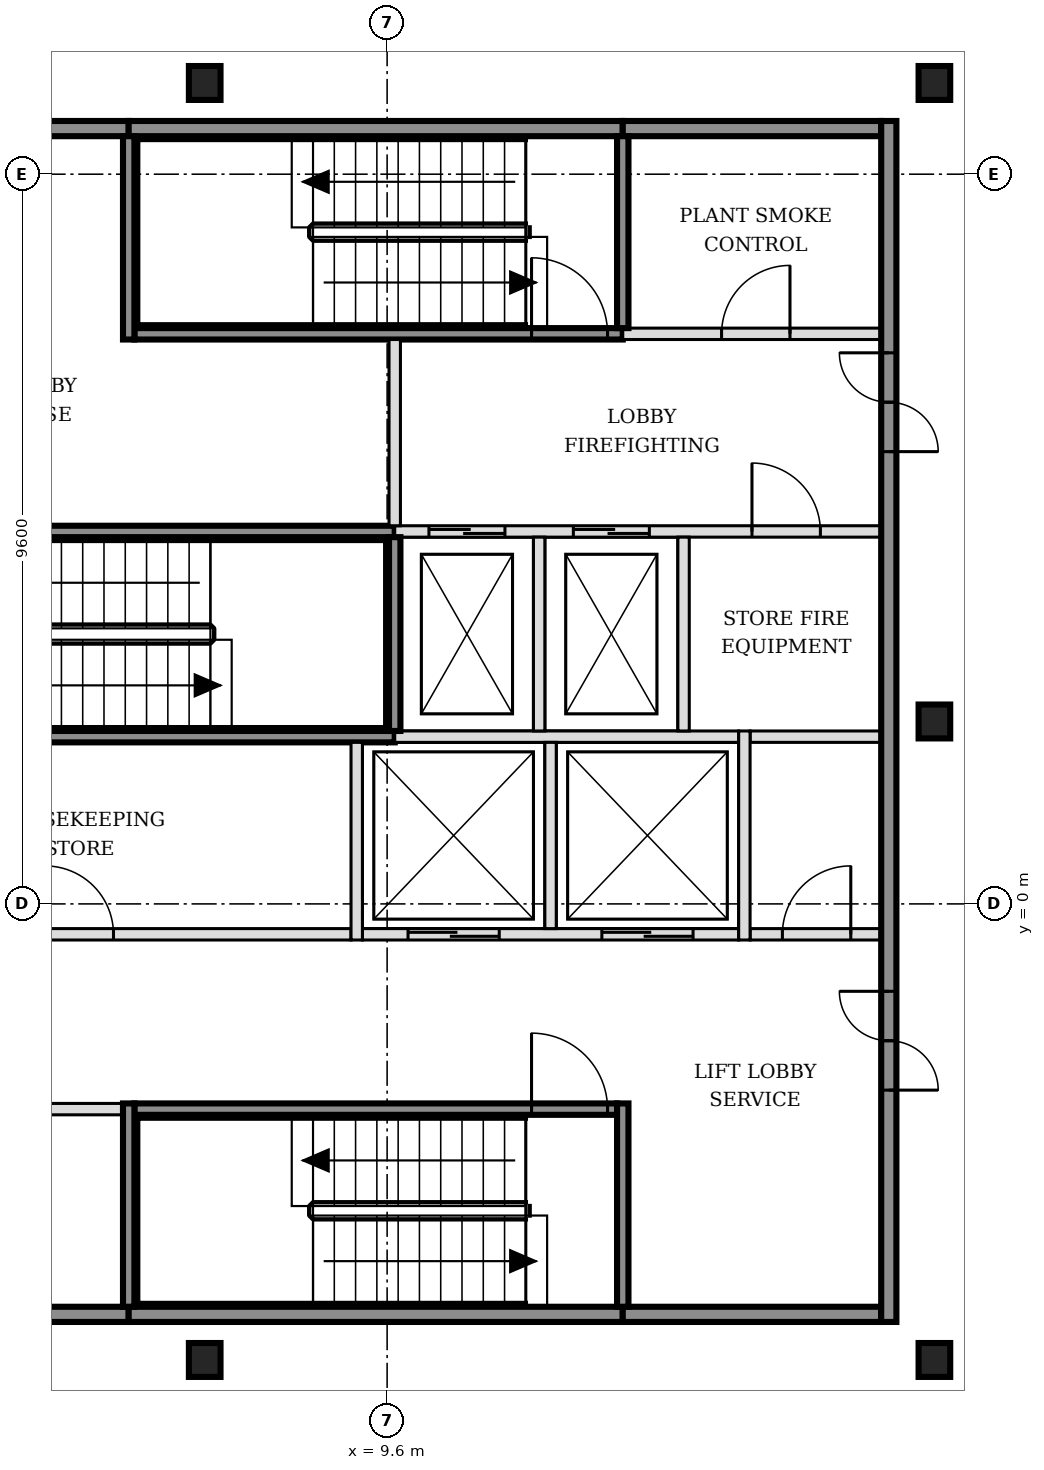
"""IFC4 building model, lengths in metres.
Left out: names, types, materials, properties, quantities, classifications, styles, units other than length and angle.
Written with IfcOpenShell. Run it as: python <this file> out.ifc"""

import sys

from ifc_helpers import new_model, si_unit, direction, frame, frame_2d, origin, origin_2d, place, context, subcontext, project, spatial, rectangle, i_section, extrude, element, fill, save


model = new_model("IFC4")
c1 = context("Model", 3, precision=1e-05, world=origin(), true_north=direction((0.0, 1.0)))
c2 = subcontext(c1, "Body", "Model", "MODEL_VIEW")
j1 = project(units=[si_unit("LENGTHUNIT", "METRE"), si_unit("PLANEANGLEUNIT", "RADIAN")], contexts=[c1])
p1 = place(None, origin())
s1 = spatial("IfcSite", under=j1, at=p1, CompositionType="ELEMENT")
p2 = place(p1, origin())
s2 = spatial("IfcBuilding", under=s1, at=p2, CompositionType="ELEMENT")
p3 = place(p2, frame((0.0, 0.0, 183.0)))
s3 = spatial("IfcBuildingStorey", under=s2, at=p3, CompositionType="ELEMENT", Elevation=183.0)
for number, where, z_axis, x_axis in (
    (1, (7.2, -6.0, -0.15), (0.0, 0.0, 1.0), (1.0, 0.0, 0.0)),
    (2, (16.8, -6.0, -0.15), (0.0, 0.0, 1.0), (1.0, 0.0, 0.0)),
    (3, (16.8, 2.4, -0.15), (0.0, 0.0, 1.0), (1.0, 0.0, 0.0)),
    (4, (7.2, 10.8, -0.15), (0.0, 0.0, 1.0), (1.0, 0.0, 0.0)),
    (5, (16.8, 10.8, -0.15), (0.0, 0.0, 1.0), (1.0, 0.0, 0.0)),
):
    element("IfcColumn", number, at=place(p3, frame(where, z_axis=z_axis, x_axis=x_axis)), inside=s3, PredefinedType="COLUMN", context=c2, shape_type="SweptSolid", body=[
        extrude(i_section(OverallWidth=0.416, OverallDepth=0.446, WebThickness=0.039, FlangeThickness=0.063, FilletRadius=0.015, at=origin_2d()), origin(), (0.0, 0.0, 1.0), 3.6),
    ])
p4 = place(p3, frame((-1.7, -5.4, 0.0), z_axis=(0.0, 0.0, 1.0), x_axis=(1.0, 0.0, 0.0)))
e6 = element("IfcWall", 6, at=p4, inside=s3, PredefinedType="SOLIDWALL", context=c2, shape_type="SweptSolid", body=[
    extrude(rectangle(XDim=7.9, YDim=0.2, at=frame_2d((3.95, 0.0))), origin(), (0.0, 0.0, 1.0), 3.45),
])
p5 = place(p3, frame((6.2, -5.4, 0.0), z_axis=(0.0, 0.0, 1.0), x_axis=(1.0, 0.0, 0.0)))
e7 = element("IfcWall", 7, at=p5, inside=s3, PredefinedType="SOLIDWALL", context=c2, shape_type="SweptSolid", body=[
    extrude(rectangle(XDim=6.5, YDim=0.2, at=frame_2d((3.25, 0.0))), origin(), (0.0, 0.0, 1.0), 3.45),
])
p6 = place(p3, frame((12.7, -5.4, 0.0), z_axis=(0.0, 0.0, 1.0), x_axis=(1.0, 0.0, 0.0)))
e8 = element("IfcWall", 8, at=p6, inside=s3, PredefinedType="SOLIDWALL", context=c2, shape_type="SweptSolid", body=[
    extrude(rectangle(XDim=3.4, YDim=0.2, at=frame_2d((1.7, 0.0))), origin(), (0.0, 0.0, 1.0), 3.45),
])
p7 = place(p3, frame((-1.7, -2.7, 0.0), z_axis=(0.0, 0.0, 1.0), x_axis=(1.0, 0.0, 0.0)))
e9 = element("IfcWall", 9, at=p7, inside=s3, PredefinedType="PARTITIONING", context=c2, shape_type="SweptSolid", body=[
    extrude(rectangle(XDim=7.825, YDim=0.15, at=frame_2d((3.913, 0.0))), origin(), (0.0, 0.0, 1.0), 3.45),
])
p8 = place(p7, frame((3.45, 0.0, 0.0)))
e10 = element("IfcOpeningElement", 10, at=p8, cuts=e9, PredefinedType="OPENING", context=c2, shape_type="SweptSolid", body=[
    extrude(rectangle(XDim=0.9, YDim=2.1, at=frame_2d((0.45, 1.05))), frame((0.0, 0.085, 0.0), z_axis=(0.0, -1.0, 0.0), x_axis=(1.0, 0.0, 0.0)), (0.0, 0.0, 1.0), 0.17),
])
p9 = place(p3, frame((6.275, -2.7, 0.0), z_axis=(0.0, 0.0, 1.0), x_axis=(1.0, 0.0, 0.0)))
e11 = element("IfcWall", 11, at=p9, inside=s3, PredefinedType="SOLIDWALL", context=c2, shape_type="SweptSolid", body=[
    extrude(rectangle(XDim=6.35, YDim=0.15, at=frame_2d((3.175, 0.0))), origin(), (0.0, 0.0, 1.0), 3.45),
])
p10 = place(p9, frame((5.225, 0.0, 0.0)))
e12 = element("IfcOpeningElement", 12, at=p10, cuts=e11, PredefinedType="OPENING", context=c2, shape_type="SweptSolid", body=[
    extrude(rectangle(XDim=1.0, YDim=2.1, at=frame_2d((0.5, 1.05))), frame((0.0, 0.085, 0.0), z_axis=(0.0, -1.0, 0.0), x_axis=(1.0, 0.0, 0.0)), (0.0, 0.0, 1.0), 0.17),
])
p11 = place(p3, frame((-1.7, -0.4, 0.0), z_axis=(0.0, 0.0, 1.0), x_axis=(1.0, 0.0, 0.0)))
e13 = element("IfcWall", 13, at=p11, inside=s3, PredefinedType="PARTITIONING", context=c2, shape_type="SweptSolid", body=[
    extrude(rectangle(XDim=10.825, YDim=0.15, at=frame_2d((5.413, 0.0))), origin(), (0.0, 0.0, 1.0), 3.45),
])
p12 = place(p11, frame((1.3, 0.0, 0.0)))
e14 = element("IfcOpeningElement", 14, at=p12, cuts=e13, PredefinedType="OPENING", context=c2, shape_type="SweptSolid", body=[
    extrude(rectangle(XDim=0.9, YDim=2.1, at=frame_2d((0.45, 1.05))), frame((0.0, 0.085, 0.0), z_axis=(0.0, -1.0, 0.0), x_axis=(1.0, 0.0, 0.0)), (0.0, 0.0, 1.0), 0.17),
])
p13 = place(p11, frame((6.8, 0.0, 0.0)))
e15 = element("IfcOpeningElement", 15, at=p13, cuts=e13, PredefinedType="OPENING", context=c2, shape_type="SweptSolid", body=[
    extrude(rectangle(XDim=0.9, YDim=2.1, at=frame_2d((0.45, 1.05))), frame((0.0, 0.085, 0.0), z_axis=(0.0, -1.0, 0.0), x_axis=(1.0, 0.0, 0.0)), (0.0, 0.0, 1.0), 0.17),
])
p14 = place(p3, frame((9.275, -0.4, 0.0), z_axis=(0.0, 0.0, 1.0), x_axis=(1.0, 0.0, 0.0)))
e16 = element("IfcWall", 16, at=p14, inside=s3, PredefinedType="SOLIDWALL", context=c2, shape_type="SweptSolid", body=[
    extrude(rectangle(XDim=4.95, YDim=0.15, at=frame_2d((2.475, 0.0))), origin(), (0.0, 0.0, 1.0), 3.45),
])
p15 = place(p14, frame((0.6, 0.0, 0.0)))
e17 = element("IfcOpeningElement", 17, at=p15, cuts=e16, PredefinedType="OPENING", context=c2, shape_type="SweptSolid", body=[
    extrude(rectangle(XDim=1.2, YDim=2.1, at=frame_2d((0.6, 1.05))), frame((0.0, 0.085, 0.0), z_axis=(0.0, -1.0, 0.0), x_axis=(1.0, 0.0, 0.0)), (0.0, 0.0, 1.0), 0.17),
])
p16 = place(p14, frame((3.15, 0.0, 0.0)))
e18 = element("IfcOpeningElement", 18, at=p16, cuts=e16, PredefinedType="OPENING", context=c2, shape_type="SweptSolid", body=[
    extrude(rectangle(XDim=1.2, YDim=2.1, at=frame_2d((0.6, 1.05))), frame((0.0, 0.085, 0.0), z_axis=(0.0, -1.0, 0.0), x_axis=(1.0, 0.0, 0.0)), (0.0, 0.0, 1.0), 0.17),
])
p17 = place(p3, frame((14.375, -0.4, 0.0), z_axis=(0.0, 0.0, 1.0), x_axis=(1.0, 0.0, 0.0)))
e19 = element("IfcWall", 19, at=p17, inside=s3, PredefinedType="PARTITIONING", context=c2, shape_type="SweptSolid", body=[
    extrude(rectangle(XDim=1.725, YDim=0.15, at=frame_2d((0.863, 0.0))), origin(), (0.0, 0.0, 1.0), 3.45),
])
p18 = place(p17, frame((0.425, 0.0, 0.0)))
e20 = element("IfcOpeningElement", 20, at=p18, cuts=e19, PredefinedType="OPENING", context=c2, shape_type="SweptSolid", body=[
    extrude(rectangle(XDim=0.9, YDim=2.1, at=frame_2d((0.45, 1.05))), frame((0.0, 0.085, 0.0), z_axis=(0.0, -1.0, 0.0), x_axis=(1.0, 0.0, 0.0)), (0.0, 0.0, 1.0), 0.17),
])
p19 = place(p3, frame((3.2, 2.2, 0.0), z_axis=(0.0, 0.0, 1.0), x_axis=(1.0, 0.0, 0.0)))
e21 = element("IfcWall", 21, at=p19, inside=s3, PredefinedType="SOLIDWALL", context=c2, shape_type="SweptSolid", body=[
    extrude(rectangle(XDim=6.5, YDim=0.15, at=frame_2d((3.25, 0.0))), origin(), (0.0, 0.0, 1.0), 3.45),
])
p20 = place(p3, frame((9.7, 2.2, 0.0), z_axis=(0.0, 0.0, 1.0), x_axis=(1.0, 0.0, 0.0)))
e22 = element("IfcWall", 22, at=p20, inside=s3, PredefinedType="SOLIDWALL", context=c2, shape_type="SweptSolid", body=[
    extrude(rectangle(XDim=4.525, YDim=0.15, at=frame_2d((2.263, 0.0))), origin(), (0.0, 0.0, 1.0), 3.45),
])
p21 = place(p3, frame((14.375, 2.2, 0.0), z_axis=(0.0, 0.0, 1.0), x_axis=(1.0, 0.0, 0.0)))
e23 = element("IfcWall", 23, at=p21, inside=s3, PredefinedType="PARTITIONING", context=c2, shape_type="SweptSolid", body=[
    extrude(rectangle(XDim=1.725, YDim=0.15, at=frame_2d((0.863, 0.0))), origin(), (0.0, 0.0, 1.0), 3.45),
])
p22 = place(p3, frame((3.2, 4.9, 0.0), z_axis=(0.0, 0.0, 1.0), x_axis=(1.0, 0.0, 0.0)))
e24 = element("IfcWall", 24, at=p22, inside=s3, PredefinedType="SOLIDWALL", context=c2, shape_type="SweptSolid", body=[
    extrude(rectangle(XDim=6.5, YDim=0.15, at=frame_2d((3.25, 0.0))), origin(), (0.0, 0.0, 1.0), 3.45),
])
p23 = place(p22, frame((0.175, 0.0, 0.0)))
e25 = element("IfcOpeningElement", 25, at=p23, cuts=e24, PredefinedType="OPENING", context=c2, shape_type="SweptSolid", body=[
    extrude(rectangle(XDim=1.0, YDim=2.1, at=frame_2d((0.5, 1.05))), frame((0.0, 0.085, 0.0), z_axis=(0.0, -1.0, 0.0), x_axis=(1.0, 0.0, 0.0)), (0.0, 0.0, 1.0), 0.17),
])
p24 = place(p3, frame((9.7, 4.9, 0.0), z_axis=(0.0, 0.0, 1.0), x_axis=(1.0, 0.0, 0.0)))
e26 = element("IfcWall", 26, at=p24, inside=s3, PredefinedType="SOLIDWALL", context=c2, shape_type="SweptSolid", body=[
    extrude(rectangle(XDim=6.4, YDim=0.15, at=frame_2d((3.2, 0.0))), origin(), (0.0, 0.0, 1.0), 3.45),
])
p25 = place(p24, frame((0.45, 0.0, 0.0)))
e27 = element("IfcOpeningElement", 27, at=p25, cuts=e26, PredefinedType="OPENING", context=c2, shape_type="SweptSolid", body=[
    extrude(rectangle(XDim=1.0, YDim=2.1, at=frame_2d((0.5, 1.05))), frame((0.0, 0.085, 0.0), z_axis=(0.0, -1.0, 0.0), x_axis=(1.0, 0.0, 0.0)), (0.0, 0.0, 1.0), 0.17),
])
p26 = place(p24, frame((2.35, 0.0, 0.0)))
e28 = element("IfcOpeningElement", 28, at=p26, cuts=e26, PredefinedType="OPENING", context=c2, shape_type="SweptSolid", body=[
    extrude(rectangle(XDim=1.0, YDim=2.1, at=frame_2d((0.5, 1.05))), frame((0.0, 0.085, 0.0), z_axis=(0.0, -1.0, 0.0), x_axis=(1.0, 0.0, 0.0)), (0.0, 0.0, 1.0), 0.17),
])
p27 = place(p24, frame((4.7, 0.0, 0.0)))
e29 = element("IfcOpeningElement", 29, at=p27, cuts=e26, PredefinedType="OPENING", context=c2, shape_type="SweptSolid", body=[
    extrude(rectangle(XDim=0.9, YDim=2.1, at=frame_2d((0.45, 1.05))), frame((0.0, 0.085, 0.0), z_axis=(0.0, -1.0, 0.0), x_axis=(1.0, 0.0, 0.0)), (0.0, 0.0, 1.0), 0.17),
])
p28 = place(p3, frame((6.275, 7.5, 0.0), z_axis=(0.0, 0.0, 1.0), x_axis=(1.0, 0.0, 0.0)))
e30 = element("IfcWall", 30, at=p28, inside=s3, PredefinedType="SOLIDWALL", context=c2, shape_type="SweptSolid", body=[
    extrude(rectangle(XDim=6.425, YDim=0.15, at=frame_2d((3.212, 0.0))), origin(), (0.0, 0.0, 1.0), 3.45),
])
p29 = place(p28, frame((5.225, 0.0, 0.0)))
e31 = element("IfcOpeningElement", 31, at=p29, cuts=e30, PredefinedType="OPENING", context=c2, shape_type="SweptSolid", body=[
    extrude(rectangle(XDim=1.0, YDim=2.1, at=frame_2d((0.5, 1.05))), frame((0.0, 0.085, 0.0), z_axis=(0.0, -1.0, 0.0), x_axis=(1.0, 0.0, 0.0)), (0.0, 0.0, 1.0), 0.17),
])
p30 = place(p3, frame((12.7, 7.5, 0.0), z_axis=(0.0, 0.0, 1.0), x_axis=(1.0, 0.0, 0.0)))
e32 = element("IfcWall", 32, at=p30, inside=s3, PredefinedType="SOLIDWALL", context=c2, shape_type="SweptSolid", body=[
    extrude(rectangle(XDim=3.4, YDim=0.15, at=frame_2d((1.7, 0.0))), origin(), (0.0, 0.0, 1.0), 3.45),
])
p31 = place(p30, frame((1.3, 0.0, 0.0)))
e33 = element("IfcOpeningElement", 33, at=p31, cuts=e32, PredefinedType="OPENING", context=c2, shape_type="SweptSolid", body=[
    extrude(rectangle(XDim=0.9, YDim=2.1, at=frame_2d((0.45, 1.05))), frame((0.0, 0.085, 0.0), z_axis=(0.0, -1.0, 0.0), x_axis=(1.0, 0.0, 0.0)), (0.0, 0.0, 1.0), 0.17),
])
p32 = place(p3, frame((-1.7, 10.2, 0.0), z_axis=(0.0, 0.0, 1.0), x_axis=(1.0, 0.0, 0.0)))
e34 = element("IfcWall", 34, at=p32, inside=s3, PredefinedType="SOLIDWALL", context=c2, shape_type="SweptSolid", body=[
    extrude(rectangle(XDim=7.9, YDim=0.2, at=frame_2d((3.95, 0.0))), origin(), (0.0, 0.0, 1.0), 3.45),
])
p33 = place(p3, frame((6.2, 10.2, 0.0), z_axis=(0.0, 0.0, 1.0), x_axis=(1.0, 0.0, 0.0)))
e35 = element("IfcWall", 35, at=p33, inside=s3, PredefinedType="SOLIDWALL", context=c2, shape_type="SweptSolid", body=[
    extrude(rectangle(XDim=6.5, YDim=0.2, at=frame_2d((3.25, 0.0))), origin(), (0.0, 0.0, 1.0), 3.45),
])
p34 = place(p3, frame((12.7, 10.2, 0.0), z_axis=(0.0, 0.0, 1.0), x_axis=(1.0, 0.0, 0.0)))
e36 = element("IfcWall", 36, at=p34, inside=s3, PredefinedType="SOLIDWALL", context=c2, shape_type="SweptSolid", body=[
    extrude(rectangle(XDim=3.4, YDim=0.2, at=frame_2d((1.7, 0.0))), origin(), (0.0, 0.0, 1.0), 3.45),
])
for number, where, z_axis, x_axis in (
    (37, (6.2, -5.3, 0.0), (0.0, 0.0, 1.0), (0.0, 1.0, 0.0)),
    (38, (6.2, 7.425, 0.0), (0.0, 0.0, 1.0), (0.0, 1.0, 0.0)),
):
    element("IfcWall", number, at=place(p3, frame(where, z_axis=z_axis, x_axis=x_axis)), inside=s3, PredefinedType="SOLIDWALL", context=c2, shape_type="SweptSolid", body=[
        extrude(rectangle(XDim=2.675, YDim=0.15, at=frame_2d((1.337, 0.0))), origin(), (0.0, 0.0, 1.0), 3.45),
    ])
p35 = place(p3, frame((9.2, -0.475, 0.0), z_axis=(0.0, 0.0, 1.0), x_axis=(0.0, 1.0, 0.0)))
e39 = element("IfcWall", 39, at=p35, inside=s3, PredefinedType="SOLIDWALL", context=c2, shape_type="SweptSolid", body=[
    extrude(rectangle(XDim=2.6, YDim=0.15, at=frame_2d((1.3, 0.0))), origin(), (0.0, 0.0, 1.0), 3.45),
])
p36 = place(p3, frame((9.7, 2.275, 0.0), z_axis=(0.0, 0.0, 1.0), x_axis=(0.0, 1.0, 0.0)))
e40 = element("IfcWall", 40, at=p36, inside=s3, PredefinedType="SOLIDWALL", context=c2, shape_type="SweptSolid", body=[
    extrude(rectangle(XDim=2.55, YDim=0.15, at=frame_2d((1.275, 0.0))), origin(), (0.0, 0.0, 1.0), 3.45),
])
p37 = place(p3, frame((9.7, 4.975, 0.0), z_axis=(0.0, 0.0, 1.0), x_axis=(0.0, 1.0, 0.0)))
e41 = element("IfcWall", 41, at=p37, inside=s3, PredefinedType="SOLIDWALL", context=c2, shape_type="SweptSolid", body=[
    extrude(rectangle(XDim=2.45, YDim=0.15, at=frame_2d((1.225, 0.0))), origin(), (0.0, 0.0, 1.0), 3.45),
])
p38 = place(p3, frame((11.6, 2.275, 0.0), z_axis=(0.0, 0.0, 1.0), x_axis=(0.0, 1.0, 0.0)))
e42 = element("IfcWall", 42, at=p38, inside=s3, PredefinedType="SOLIDWALL", context=c2, shape_type="SweptSolid", body=[
    extrude(rectangle(XDim=2.55, YDim=0.15, at=frame_2d((1.275, 0.0))), origin(), (0.0, 0.0, 1.0), 3.45),
])
p39 = place(p3, frame((11.75, -0.325, 0.0), z_axis=(0.0, 0.0, 1.0), x_axis=(0.0, 1.0, 0.0)))
e43 = element("IfcWall", 43, at=p39, inside=s3, PredefinedType="SOLIDWALL", context=c2, shape_type="SweptSolid", body=[
    extrude(rectangle(XDim=2.45, YDim=0.15, at=frame_2d((1.225, 0.0))), origin(), (0.0, 0.0, 1.0), 3.45),
])
p40 = place(p3, frame((12.7, -5.3, 0.0), z_axis=(0.0, 0.0, 1.0), x_axis=(0.0, 1.0, 0.0)))
e44 = element("IfcWall", 44, at=p40, inside=s3, PredefinedType="SOLIDWALL", context=c2, shape_type="SweptSolid", body=[
    extrude(rectangle(XDim=2.675, YDim=0.15, at=frame_2d((1.337, 0.0))), origin(), (0.0, 0.0, 1.0), 3.45),
])
p41 = place(p3, frame((12.7, 7.575, 0.0), z_axis=(0.0, 0.0, 1.0), x_axis=(0.0, 1.0, 0.0)))
e45 = element("IfcWall", 45, at=p41, inside=s3, PredefinedType="SOLIDWALL", context=c2, shape_type="SweptSolid", body=[
    extrude(rectangle(XDim=2.525, YDim=0.15, at=frame_2d((1.263, 0.0))), origin(), (0.0, 0.0, 1.0), 3.45),
])
p42 = place(p3, frame((13.5, 2.275, 0.0), z_axis=(0.0, 0.0, 1.0), x_axis=(0.0, 1.0, 0.0)))
e46 = element("IfcWall", 46, at=p42, inside=s3, PredefinedType="SOLIDWALL", context=c2, shape_type="SweptSolid", body=[
    extrude(rectangle(XDim=2.55, YDim=0.15, at=frame_2d((1.275, 0.0))), origin(), (0.0, 0.0, 1.0), 3.45),
])
p43 = place(p3, frame((14.3, -0.475, 0.0), z_axis=(0.0, 0.0, 1.0), x_axis=(0.0, 1.0, 0.0)))
e47 = element("IfcWall", 47, at=p43, inside=s3, PredefinedType="SOLIDWALL", context=c2, shape_type="SweptSolid", body=[
    extrude(rectangle(XDim=2.75, YDim=0.15, at=frame_2d((1.375, 0.0))), origin(), (0.0, 0.0, 1.0), 3.45),
])
p44 = place(p3, frame((16.2, -5.5, 0.0), z_axis=(0.0, 0.0, 1.0), x_axis=(0.0, 1.0, 0.0)))
e48 = element("IfcWall", 48, at=p44, inside=s3, PredefinedType="SOLIDWALL", context=c2, shape_type="SweptSolid", body=[
    extrude(rectangle(XDim=15.8, YDim=0.2, at=frame_2d((7.9, 0.0))), origin(), (0.0, 0.0, 1.0), 3.45),
])
p45 = place(p44, frame((3.05, 0.0, 0.0)))
e49 = element("IfcOpeningElement", 49, at=p45, cuts=e48, PredefinedType="OPENING", context=c2, shape_type="SweptSolid", body=[
    extrude(rectangle(XDim=1.3, YDim=2.1, at=frame_2d((0.65, 1.05))), frame((0.0, 0.11, 0.0), z_axis=(0.0, -1.0, 0.0), x_axis=(1.0, 0.0, 0.0)), (0.0, 0.0, 1.0), 0.22),
])
p46 = place(p44, frame((11.45, 0.0, 0.0)))
e50 = element("IfcOpeningElement", 50, at=p46, cuts=e48, PredefinedType="OPENING", context=c2, shape_type="SweptSolid", body=[
    extrude(rectangle(XDim=1.3, YDim=2.1, at=frame_2d((0.65, 1.05))), frame((0.0, 0.11, 0.0), z_axis=(0.0, -1.0, 0.0), x_axis=(1.0, 0.0, 0.0)), (0.0, 0.0, 1.0), 0.22),
])
p47 = place(p15, origin())
e51 = element("IfcDoor", 51, at=p47, inside=s3, OperationType="DOUBLE_DOOR_SLIDING", PredefinedType="DOOR", context=c2, shape_type="SweptSolid", body=[
    extrude(rectangle(XDim=1.2, YDim=2.1, at=frame_2d((0.6, 1.05))), frame((0.0, 0.025, 0.0), z_axis=(0.0, -1.0, 0.0), x_axis=(1.0, 0.0, 0.0)), (0.0, 0.0, 1.0), 0.05),
])
fill(e17, e51)
p48 = place(p16, origin())
e52 = element("IfcDoor", 52, at=p48, inside=s3, OperationType="DOUBLE_DOOR_SLIDING", PredefinedType="DOOR", context=c2, shape_type="SweptSolid", body=[
    extrude(rectangle(XDim=1.2, YDim=2.1, at=frame_2d((0.6, 1.05))), frame((0.0, 0.025, 0.0), z_axis=(0.0, -1.0, 0.0), x_axis=(1.0, 0.0, 0.0)), (0.0, 0.0, 1.0), 0.05),
])
fill(e18, e52)
p49 = place(p25, origin())
e53 = element("IfcDoor", 53, at=p49, inside=s3, OperationType="DOUBLE_DOOR_SLIDING", PredefinedType="DOOR", context=c2, shape_type="SweptSolid", body=[
    extrude(rectangle(XDim=1.0, YDim=2.1, at=frame_2d((0.5, 1.05))), frame((0.0, 0.025, 0.0), z_axis=(0.0, -1.0, 0.0), x_axis=(1.0, 0.0, 0.0)), (0.0, 0.0, 1.0), 0.05),
])
fill(e27, e53)
p50 = place(p26, origin())
e54 = element("IfcDoor", 54, at=p50, inside=s3, OperationType="DOUBLE_DOOR_SLIDING", PredefinedType="DOOR", context=c2, shape_type="SweptSolid", body=[
    extrude(rectangle(XDim=1.0, YDim=2.1, at=frame_2d((0.5, 1.05))), frame((0.0, 0.025, 0.0), z_axis=(0.0, -1.0, 0.0), x_axis=(1.0, 0.0, 0.0)), (0.0, 0.0, 1.0), 0.05),
])
fill(e28, e54)
p51 = place(p10, origin())
e55 = element("IfcDoor", 55, at=p51, inside=s3, OperationType="SINGLE_SWING_LEFT", PredefinedType="DOOR", context=c2, shape_type="SweptSolid", body=[
    extrude(rectangle(XDim=1.0, YDim=2.1, at=frame_2d((0.5, 1.05))), frame((0.0, 0.025, 0.0), z_axis=(0.0, -1.0, 0.0), x_axis=(1.0, 0.0, 0.0)), (0.0, 0.0, 1.0), 0.05),
])
fill(e12, e55)
p52 = place(p29, origin())
e56 = element("IfcDoor", 56, at=p52, inside=s3, OperationType="SINGLE_SWING_LEFT", PredefinedType="DOOR", context=c2, shape_type="SweptSolid", body=[
    extrude(rectangle(XDim=1.0, YDim=2.1, at=frame_2d((0.5, 1.05))), frame((0.0, 0.025, 0.0), z_axis=(0.0, -1.0, 0.0), x_axis=(1.0, 0.0, 0.0)), (0.0, 0.0, 1.0), 0.05),
])
fill(e31, e56)
p53 = place(p45, origin())
e57 = element("IfcDoor", 57, at=p53, inside=s3, OperationType="DOUBLE_DOOR_SINGLE_SWING", PredefinedType="DOOR", context=c2, shape_type="SweptSolid", body=[
    extrude(rectangle(XDim=1.3, YDim=2.1, at=frame_2d((0.65, 1.05))), frame((0.0, 0.025, 0.0), z_axis=(0.0, -1.0, 0.0), x_axis=(1.0, 0.0, 0.0)), (0.0, 0.0, 1.0), 0.05),
])
fill(e49, e57)
p54 = place(p46, origin())
e58 = element("IfcDoor", 58, at=p54, inside=s3, OperationType="DOUBLE_DOOR_SINGLE_SWING", PredefinedType="DOOR", context=c2, shape_type="SweptSolid", body=[
    extrude(rectangle(XDim=1.3, YDim=2.1, at=frame_2d((0.65, 1.05))), frame((0.0, 0.025, 0.0), z_axis=(0.0, -1.0, 0.0), x_axis=(1.0, 0.0, 0.0)), (0.0, 0.0, 1.0), 0.05),
])
fill(e50, e58)
p55 = place(p18, origin())
e59 = element("IfcDoor", 59, at=p55, inside=s3, OperationType="SINGLE_SWING_RIGHT", PredefinedType="DOOR", context=c2, shape_type="SweptSolid", body=[
    extrude(rectangle(XDim=0.9, YDim=2.1, at=frame_2d((0.45, 1.05))), frame((0.0, 0.025, 0.0), z_axis=(0.0, -1.0, 0.0), x_axis=(1.0, 0.0, 0.0)), (0.0, 0.0, 1.0), 0.05),
])
fill(e20, e59)
p56 = place(p27, origin())
e60 = element("IfcDoor", 60, at=p56, inside=s3, OperationType="SINGLE_SWING_LEFT", PredefinedType="DOOR", context=c2, shape_type="SweptSolid", body=[
    extrude(rectangle(XDim=0.9, YDim=2.1, at=frame_2d((0.45, 1.05))), frame((0.0, 0.025, 0.0), z_axis=(0.0, -1.0, 0.0), x_axis=(1.0, 0.0, 0.0)), (0.0, 0.0, 1.0), 0.05),
])
fill(e29, e60)
p57 = place(p31, origin())
e61 = element("IfcDoor", 61, at=p57, inside=s3, OperationType="SINGLE_SWING_RIGHT", PredefinedType="DOOR", context=c2, shape_type="SweptSolid", body=[
    extrude(rectangle(XDim=0.9, YDim=2.1, at=frame_2d((0.45, 1.05))), frame((0.0, 0.025, 0.0), z_axis=(0.0, -1.0, 0.0), x_axis=(1.0, 0.0, 0.0)), (0.0, 0.0, 1.0), 0.05),
])
fill(e33, e61)
p58 = place(p13, origin())
e62 = element("IfcDoor", 62, at=p58, inside=s3, OperationType="SINGLE_SWING_LEFT", PredefinedType="DOOR", context=c2, shape_type="SweptSolid", body=[
    extrude(rectangle(XDim=0.9, YDim=2.1, at=frame_2d((0.45, 1.05))), frame((0.0, 0.025, 0.0), z_axis=(0.0, -1.0, 0.0), x_axis=(1.0, 0.0, 0.0)), (0.0, 0.0, 1.0), 0.05),
])
fill(e15, e62)
save(model, sys.argv[1])
